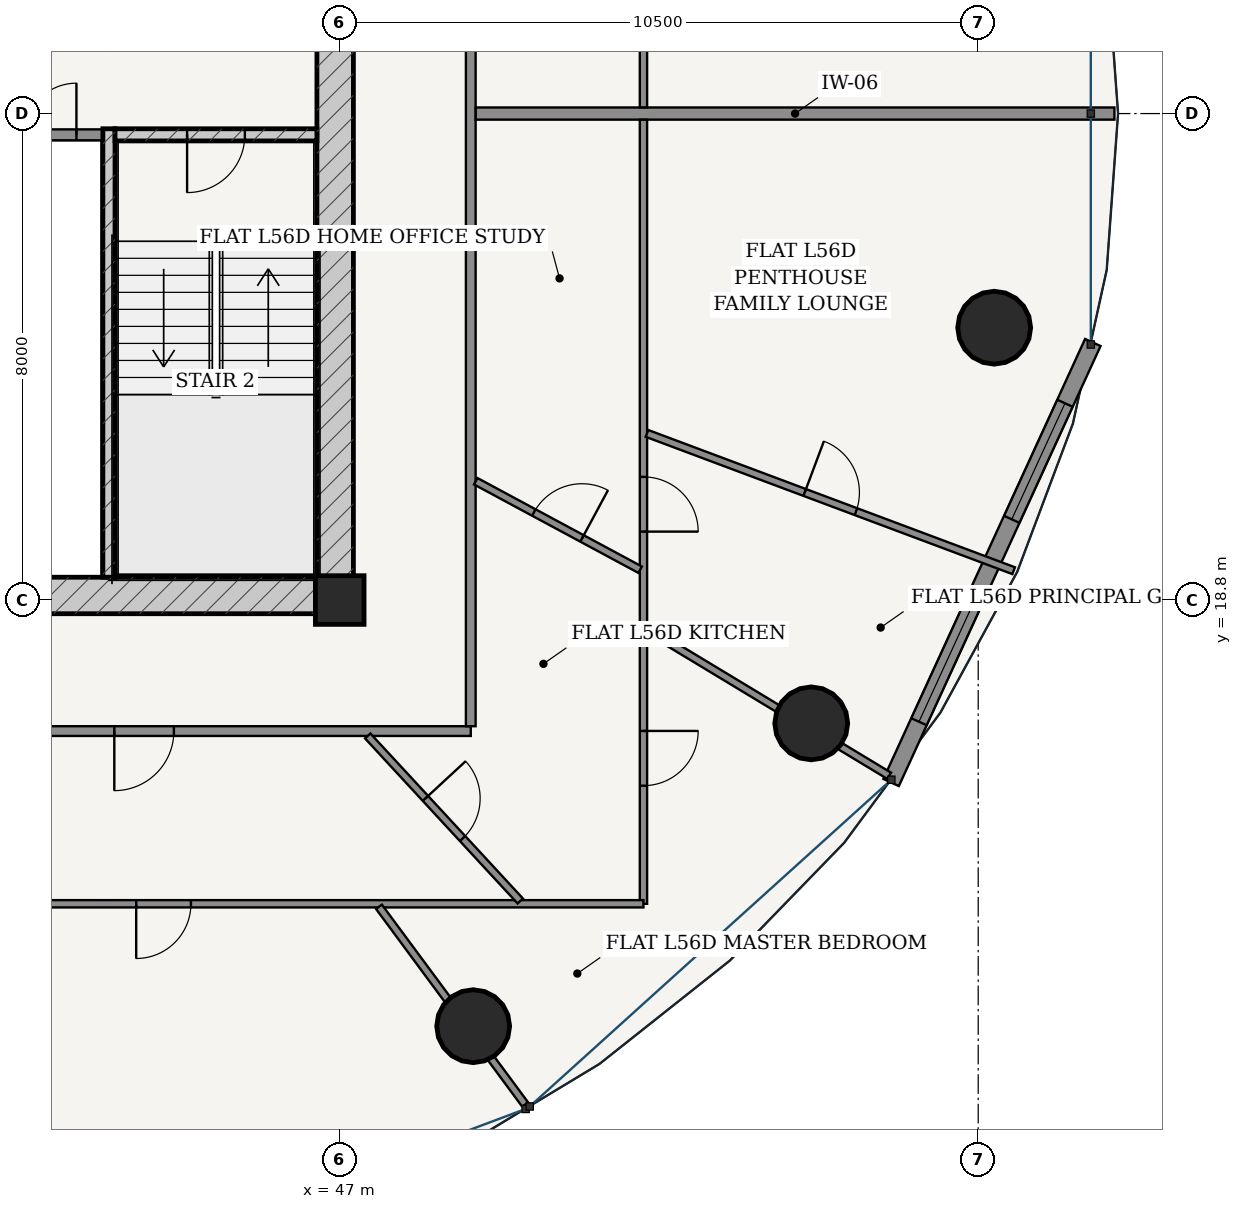
"""IFC4 building model, lengths in metres.
Left out: names, types, materials, properties, quantities, classifications, styles, units other than length and angle.
Written with IfcOpenShell. Run it as: python <this file> out.ifc"""

import sys

from ifc_helpers import new_model, si_unit, direction, frame, frame_2d, origin, origin_2d, place, context, subcontext, project, spatial, rectangle, hollow_circle, extrude, source, transform, mapped, element, fill, save


model = new_model("IFC4")
c1 = context("Model", 3, precision=1e-05, world=origin(), true_north=direction((-0.2419218956, 0.970295726276)))
c2 = subcontext(c1, "Body", "Model", "MODEL_VIEW")
j1 = project(units=[si_unit("LENGTHUNIT", "METRE"), si_unit("PLANEANGLEUNIT", "RADIAN")], contexts=[c1])
p1 = place(None, origin())
s1 = spatial("IfcSite", under=j1, at=p1, CompositionType="ELEMENT")
p2 = place(p1, origin())
s2 = spatial("IfcBuilding", under=s1, at=p2, CompositionType="ELEMENT")
p3 = place(p2, frame((0.0, 0.0, 213.4)))
s3 = spatial("IfcBuildingStorey", under=s2, at=p3, CompositionType="ELEMENT", Elevation=213.4)
p4 = place(p3, frame((47.0, 18.8, 0.0), z_axis=(0.0, 0.0, 1.0), x_axis=(1.0, 0.0, 0.0)))
e1 = element("IfcColumn", 1, at=p4, inside=s3, PredefinedType="COLUMN", context=c2, shape_type="SweptSolid", body=[
    extrude(rectangle(XDim=0.8, YDim=0.8, at=origin_2d()), origin(), (0.0, 0.0, 1.0), 3.7),
])
p5 = place(p3, frame((28.775, 18.875, 0.0), z_axis=(0.0, 0.0, 1.0), x_axis=(1.0, 0.0, 0.0)))
e2 = element("IfcWall", 2, at=p5, inside=s3, PredefinedType="SHEAR", context=c2, shape_type="SweptSolid", body=[
    extrude(rectangle(XDim=18.45, YDim=0.6, at=frame_2d((9.225, 0.0))), origin(), (0.0, 0.0, 1.0), 3.435),
])
p6 = place(p5, frame((7.46, 0.0, 0.0)))
e3 = element("IfcOpeningElement", 3, at=p6, cuts=e2, PredefinedType="OPENING", context=c2, shape_type="SweptSolid", body=[
    extrude(rectangle(XDim=0.85, YDim=2.1, at=frame_2d((0.425, 1.05))), frame((0.0, 0.31, 0.0), z_axis=(0.0, -1.0, 0.0), x_axis=(1.0, 0.0, 0.0)), (0.0, 0.0, 1.0), 0.62),
])
p7 = place(p5, frame((10.54, 0.0, 0.0)))
e4 = element("IfcOpeningElement", 4, at=p7, cuts=e2, PredefinedType="OPENING", context=c2, shape_type="SweptSolid", body=[
    extrude(rectangle(XDim=0.85, YDim=2.1, at=frame_2d((0.425, 1.05))), frame((0.0, 0.31, 0.0), z_axis=(0.0, -1.0, 0.0), x_axis=(1.0, 0.0, 0.0)), (0.0, 0.0, 1.0), 0.62),
])
p8 = place(p3, frame((46.925, 19.175, 0.0), z_axis=(0.0, 0.0, 1.0), x_axis=(0.0, 1.0, 0.0)))
e5 = element("IfcWall", 5, at=p8, inside=s3, PredefinedType="SHEAR", context=c2, shape_type="SweptSolid", body=[
    extrude(rectangle(XDim=15.25, YDim=0.6, at=frame_2d((7.625, 0.0))), origin(), (0.0, 0.0, 1.0), 3.435),
])
p9 = place(p8, frame((9.875, 0.0, 0.0)))
e6 = element("IfcOpeningElement", 6, at=p9, cuts=e5, PredefinedType="OPENING", context=c2, shape_type="SweptSolid", body=[
    extrude(rectangle(XDim=1.5, YDim=2.2, at=frame_2d((0.75, 1.1))), frame((0.0, 0.31, 0.0), z_axis=(0.0, -1.0, 0.0), x_axis=(1.0, 0.0, 0.0)), (0.0, 0.0, 1.0), 0.62),
])
p10 = place(p3, frame((43.205, 19.175, 0.0), z_axis=(0.0, 0.0, 1.0), x_axis=(0.0, 1.0, 0.0)))
e7 = element("IfcWall", 7, at=p10, inside=s3, PredefinedType="SOLIDWALL", context=c2, shape_type="SweptSolid", body=[
    extrude(rectangle(XDim=7.375, YDim=0.2, at=frame_2d((3.688, 0.0))), origin(), (0.0, 0.0, 1.0), 3.435),
])
p11 = place(p3, frame((43.305, 26.45, 0.0), z_axis=(0.0, 0.0, 1.0), x_axis=(1.0, 0.0, 0.0)))
e8 = element("IfcWall", 8, at=p11, inside=s3, PredefinedType="SOLIDWALL", context=c2, shape_type="SweptSolid", body=[
    extrude(rectangle(XDim=3.32, YDim=0.2, at=frame_2d((1.66, 0.0))), origin(), (0.0, 0.0, 1.0), 3.435),
])
p12 = place(p11, frame((1.185, 0.0, 0.0)))
e9 = element("IfcOpeningElement", 9, at=p12, cuts=e8, PredefinedType="OPENING", context=c2, shape_type="SweptSolid", body=[
    extrude(rectangle(XDim=0.95, YDim=2.15, at=frame_2d((0.475, 1.075))), frame((0.0, 0.11, 0.0), z_axis=(0.0, -1.0, 0.0), x_axis=(1.0, 0.0, 0.0)), (0.0, 0.0, 1.0), 0.22),
])
for number, where, z_axis, x_axis in (
    (10, (49.195, 11.792, 0.0), (0.0, 0.0, 1.0), (1.0, 0.0, 0.0)),
    (11, (54.754, 16.772, 0.0), (0.0, 0.0, 1.0), (1.0, 0.0, 0.0)),
    (12, (57.763, 23.279, 0.0), (0.0, 0.0, 1.0), (1.0, 0.0, 0.0)),
):
    element("IfcColumn", number, at=place(p3, frame(where, z_axis=z_axis, x_axis=x_axis)), inside=s3, PredefinedType="COLUMN", context=c2, shape_type="SweptSolid", body=[
        extrude(hollow_circle(Radius=0.6, WallThickness=0.038, at=origin_2d()), origin(), (0.0, 0.0, 1.0), 3.7),
    ])
p13 = place(p3, frame((56.068, 15.799, 0.0), z_axis=(0.0, 0.0, 1.0), x_axis=(0.416717018135, 0.909036262641, 0.0)))
e13 = element("IfcWall", 13, at=p13, inside=s3, PredefinedType="SOLIDWALL", context=c2, shape_type="SweptSolid", body=[
    extrude(rectangle(XDim=7.96, YDim=0.28, at=frame_2d((3.98, 0.0))), origin(), (0.0, 0.0, 1.0), 3.435),
])
p14 = place(p13, frame((1.099, 0.0, 0.85)))
e14 = element("IfcOpeningElement", 14, at=p14, cuts=e13, PredefinedType="OPENING", context=c2, shape_type="SweptSolid", body=[
    extrude(rectangle(XDim=2.1, YDim=1.95, at=frame_2d((1.05, 0.975))), frame((0.0, 0.15, 0.0), z_axis=(0.0, -1.0, 0.0), x_axis=(1.0, 0.0, 0.0)), (0.0, 0.0, 1.0), 0.3),
])
p15 = place(p13, frame((4.761, 0.0, 0.85)))
e15 = element("IfcOpeningElement", 15, at=p15, cuts=e13, PredefinedType="OPENING", context=c2, shape_type="SweptSolid", body=[
    extrude(rectangle(XDim=2.1, YDim=1.95, at=frame_2d((1.05, 0.975))), frame((0.0, 0.15, 0.0), z_axis=(0.0, -1.0, 0.0), x_axis=(1.0, 0.0, 0.0)), (0.0, 0.0, 1.0), 0.3),
])
p16 = place(p3, frame((41.39, 26.45, 0.0), z_axis=(0.0, 0.0, 1.0), x_axis=(1.0, 0.0, 0.0)))
e16 = element("IfcWall", 16, at=p16, inside=s3, PredefinedType="PARTITIONING", context=c2, shape_type="SweptSolid", body=[
    extrude(rectangle(XDim=1.71, YDim=0.18, at=frame_2d((0.855, 0.0))), origin(), (0.0, 0.0, 1.0), 3.435),
])
p17 = place(p16, frame((0.43, 0.0, 0.0)))
e17 = element("IfcOpeningElement", 17, at=p17, cuts=e16, PredefinedType="OPENING", context=c2, shape_type="SweptSolid", body=[
    extrude(rectangle(XDim=0.85, YDim=2.1, at=frame_2d((0.425, 1.05))), frame((0.0, 0.1, 0.0), z_axis=(0.0, -1.0, 0.0), x_axis=(1.0, 0.0, 0.0)), (0.0, 0.0, 1.0), 0.2),
])
p18 = place(p3, frame((34.32, 16.645, 0.0), z_axis=(0.0, 0.0, 1.0), x_axis=(1.0, 0.0, 0.0)))
e18 = element("IfcWall", 18, at=p18, inside=s3, PredefinedType="PARTITIONING", context=c2, shape_type="SweptSolid", body=[
    extrude(rectangle(XDim=14.835, YDim=0.16, at=frame_2d((7.417, 0.0))), origin(), (0.0, 0.0, 1.0), 2.951),
])
p19 = place(p18, frame((8.973, 0.0, 0.0)))
e19 = element("IfcOpeningElement", 19, at=p19, cuts=e18, PredefinedType="OPENING", context=c2, shape_type="SweptSolid", body=[
    extrude(rectangle(XDim=0.98, YDim=2.2, at=frame_2d((0.49, 1.1))), frame((0.0, 0.09, 0.0), z_axis=(0.0, -1.0, 0.0), x_axis=(1.0, 0.0, 0.0)), (0.0, 0.0, 1.0), 0.18),
])
p20 = place(p3, frame((49.155, 16.725, 0.0), z_axis=(0.0, 0.0, 1.0), x_axis=(0.0, 1.0, 0.0)))
e20 = element("IfcWall", 20, at=p20, inside=s3, PredefinedType="PARTITIONING", context=c2, shape_type="SweptSolid", body=[
    extrude(rectangle(XDim=18.3, YDim=0.16, at=frame_2d((9.15, 0.0))), origin(), (0.0, 0.0, 1.0), 2.951),
])
p21 = place(p20, frame((15.837, 0.0, 0.0)))
e21 = element("IfcOpeningElement", 21, at=p21, cuts=e20, PredefinedType="OPENING", context=c2, shape_type="SweptSolid", body=[
    extrude(rectangle(XDim=0.98, YDim=2.2, at=frame_2d((0.49, 1.1))), frame((0.0, 0.09, 0.0), z_axis=(0.0, -1.0, 0.0), x_axis=(1.0, 0.0, 0.0)), (0.0, 0.0, 1.0), 0.18),
])
p22 = place(p3, frame((49.237, 26.8, 0.0), z_axis=(0.0, 0.0, 1.0), x_axis=(1.0, 0.0, 0.0)))
e22 = element("IfcWall", 22, at=p22, inside=s3, PredefinedType="PARTITIONING", context=c2, shape_type="SweptSolid", body=[
    extrude(rectangle(XDim=10.503, YDim=0.2, at=frame_2d((5.251, 0.0))), origin(), (0.0, 0.0, 1.0), 2.951),
])
p23 = place(p3, frame((51.995, 37.945, 0.0), z_axis=(0.0, 0.0, 1.0), x_axis=(0.0, -1.0, 0.0)))
e23 = element("IfcWall", 23, at=p23, inside=s3, PredefinedType="PARTITIONING", context=c2, shape_type="SweptSolid", body=[
    extrude(rectangle(XDim=11.043, YDim=0.12, at=frame_2d((5.521, 0.0))), origin(), (0.0, 0.0, 1.0), 2.951),
])
p24 = place(p23, frame((2.46, 0.0, 0.0)))
e24 = element("IfcOpeningElement", 24, at=p24, cuts=e23, PredefinedType="OPENING", context=c2, shape_type="SweptSolid", body=[
    extrude(rectangle(XDim=0.9, YDim=2.15, at=frame_2d((0.45, 1.075))), frame((0.0, 0.07, 0.0), z_axis=(0.0, -1.0, 0.0), x_axis=(1.0, 0.0, 0.0)), (0.0, 0.0, 1.0), 0.14),
])
p25 = place(p3, frame((51.995, 26.698, 0.0), z_axis=(0.0, 0.0, 1.0), x_axis=(0.0, -1.0, 0.0)))
e25 = element("IfcWall", 25, at=p25, inside=s3, PredefinedType="PARTITIONING", context=c2, shape_type="SweptSolid", body=[
    extrude(rectangle(XDim=12.893, YDim=0.12, at=frame_2d((6.447, 0.0))), origin(), (0.0, 0.0, 1.0), 2.951),
])
p26 = place(p25, frame((10.051, 0.0, 0.0)))
e26 = element("IfcOpeningElement", 26, at=p26, cuts=e25, PredefinedType="OPENING", context=c2, shape_type="SweptSolid", body=[
    extrude(rectangle(XDim=0.9, YDim=2.15, at=frame_2d((0.45, 1.075))), frame((0.0, 0.07, 0.0), z_axis=(0.0, -1.0, 0.0), x_axis=(1.0, 0.0, 0.0)), (0.0, 0.0, 1.0), 0.14),
])
p27 = place(p25, frame((5.873, 0.0, 0.0)))
e27 = element("IfcOpeningElement", 27, at=p27, cuts=e25, PredefinedType="OPENING", context=c2, shape_type="SweptSolid", body=[
    extrude(rectangle(XDim=0.9, YDim=2.15, at=frame_2d((0.45, 1.075))), frame((0.0, 0.07, 0.0), z_axis=(0.0, -1.0, 0.0), x_axis=(1.0, 0.0, 0.0)), (0.0, 0.0, 1.0), 0.14),
])
p28 = place(p3, frame((51.995, 13.805, 0.0), z_axis=(0.0, 0.0, 1.0), x_axis=(-1.0, 0.0, 0.0)))
e28 = element("IfcWall", 28, at=p28, inside=s3, PredefinedType="PARTITIONING", context=c2, shape_type="SweptSolid", body=[
    extrude(rectangle(XDim=16.753, YDim=0.12, at=frame_2d((8.377, 0.0))), origin(), (0.0, 0.0, 1.0), 2.951),
])
p29 = place(p28, frame((7.442, 0.0, 0.0)))
e29 = element("IfcOpeningElement", 29, at=p29, cuts=e28, PredefinedType="OPENING", context=c2, shape_type="SweptSolid", body=[
    extrude(rectangle(XDim=0.9, YDim=2.15, at=frame_2d((0.45, 1.075))), frame((0.0, 0.07, 0.0), z_axis=(0.0, -1.0, 0.0), x_axis=(1.0, 0.0, 0.0)), (0.0, 0.0, 1.0), 0.14),
])
p30 = place(p3, frame((47.646, 13.755, 0.0), z_axis=(0.0, 0.0, 1.0), x_axis=(0.594518373783, -0.80408202519, 0.0)))
e30 = element("IfcWall", 30, at=p30, inside=s3, PredefinedType="PARTITIONING", context=c2, shape_type="SweptSolid", body=[
    extrude(rectangle(XDim=4.044, YDim=0.12, at=frame_2d((2.022, 0.0))), origin(), (0.0, 0.0, 1.0), 2.951),
])
p31 = place(p3, frame((52.048, 18.318, 0.0), z_axis=(0.0, 0.0, 1.0), x_axis=(0.856051317976, -0.516890840499, 0.0)))
e31 = element("IfcWall", 31, at=p31, inside=s3, PredefinedType="PARTITIONING", context=c2, shape_type="SweptSolid", body=[
    extrude(rectangle(XDim=4.658, YDim=0.12, at=frame_2d((2.329, 0.0))), origin(), (0.0, 0.0, 1.0), 2.951),
])
p32 = place(p3, frame((52.053, 21.54, 0.0), z_axis=(0.0, 0.0, 1.0), x_axis=(0.936534700322, -0.350574892274, 0.0)))
e32 = element("IfcWall", 32, at=p32, inside=s3, PredefinedType="PARTITIONING", context=c2, shape_type="SweptSolid", body=[
    extrude(rectangle(XDim=6.439, YDim=0.12, at=frame_2d((3.219, 0.0))), origin(), (0.0, 0.0, 1.0), 2.951),
])
p33 = place(p32, frame((2.769, 0.0, 0.0)))
e33 = element("IfcOpeningElement", 33, at=p33, cuts=e32, PredefinedType="OPENING", context=c2, shape_type="SweptSolid", body=[
    extrude(rectangle(XDim=0.9, YDim=2.15, at=frame_2d((0.45, 1.075))), frame((0.0, 0.07, 0.0), z_axis=(0.0, -1.0, 0.0), x_axis=(1.0, 0.0, 0.0)), (0.0, 0.0, 1.0), 0.14),
])
p34 = place(p3, frame((47.46, 16.565, 0.0), z_axis=(0.0, 0.0, 1.0), x_axis=(0.678787443458, -0.734334805524, 0.0)))
e34 = element("IfcWall", 34, at=p34, inside=s3, PredefinedType="PARTITIONING", context=c2, shape_type="SweptSolid", body=[
    extrude(rectangle(XDim=3.696, YDim=0.12, at=frame_2d((1.848, 0.0))), origin(), (0.0, 0.0, 1.0), 2.951),
])
p35 = place(p34, frame((1.398, 0.0, 0.0)))
e35 = element("IfcOpeningElement", 35, at=p35, cuts=e34, PredefinedType="OPENING", context=c2, shape_type="SweptSolid", body=[
    extrude(rectangle(XDim=0.9, YDim=2.15, at=frame_2d((0.45, 1.075))), frame((0.0, 0.07, 0.0), z_axis=(0.0, -1.0, 0.0), x_axis=(1.0, 0.0, 0.0)), (0.0, 0.0, 1.0), 0.14),
])
p36 = place(p3, frame((49.237, 20.753, 0.0), z_axis=(0.0, 0.0, 1.0), x_axis=(0.880601289356, -0.473857963091, 0.0)))
e36 = element("IfcWall", 36, at=p36, inside=s3, PredefinedType="PARTITIONING", context=c2, shape_type="SweptSolid", body=[
    extrude(rectangle(XDim=3.07, YDim=0.12, at=frame_2d((1.535, 0.0))), origin(), (0.0, 0.0, 1.0), 3.11),
])
p37 = place(p36, frame((1.085, 0.0, 0.0)))
e37 = element("IfcOpeningElement", 37, at=p37, cuts=e36, PredefinedType="OPENING", context=c2, shape_type="SweptSolid", body=[
    extrude(rectangle(XDim=0.9, YDim=2.15, at=frame_2d((0.45, 1.075))), frame((0.0, 0.07, 0.0), z_axis=(0.0, -1.0, 0.0), x_axis=(1.0, 0.0, 0.0)), (0.0, 0.0, 1.0), 0.14),
])
m1 = source(origin(), c2, "Body", "SweptSolid", [
    extrude(rectangle(XDim=2.1, YDim=1.95, at=frame_2d((1.05, 0.975))), frame((0.0, 0.03, 0.0), z_axis=(0.0, -1.0, 0.0), x_axis=(1.0, 0.0, 0.0)), (0.0, 0.0, 1.0), 0.06),
])
p38 = place(p14, origin())
e38 = element("IfcWindow", 38, at=p38, inside=s3, PartitioningType="SINGLE_PANEL", PredefinedType="WINDOW", context=c2, shape_type="MappedRepresentation", body=[
    mapped(m1, transform((0.0, 0.0, 0.0), scale=1.0)),
])
fill(e14, e38)
p39 = place(p15, origin())
e39 = element("IfcWindow", 39, at=p39, inside=s3, PartitioningType="SINGLE_PANEL", PredefinedType="WINDOW", context=c2, shape_type="MappedRepresentation", body=[
    mapped(m1, transform((0.0, 0.0, 0.0), scale=1.0)),
])
fill(e15, e39)
m2 = source(origin(), c2, "Body", "SweptSolid", [
    extrude(rectangle(XDim=0.95, YDim=2.15, at=frame_2d((0.475, 1.075))), frame((0.0, 0.025, 0.0), z_axis=(0.0, -1.0, 0.0), x_axis=(1.0, 0.0, 0.0)), (0.0, 0.0, 1.0), 0.05),
])
p40 = place(p12, frame((0.95, 0.0, 0.0), z_axis=(0.0, 0.0, 1.0), x_axis=(-1.0, 0.0, 0.0)))
e40 = element("IfcDoor", 40, at=p40, inside=s3, OperationType="SINGLE_SWING_RIGHT", PredefinedType="DOOR", context=c2, shape_type="MappedRepresentation", body=[
    mapped(m2, transform((0.0, 0.0, 0.0), scale=1.0)),
])
fill(e9, e40)
m3 = source(origin(), c2, "Body", "SweptSolid", [
    extrude(rectangle(XDim=0.85, YDim=2.1, at=frame_2d((0.425, 1.05))), frame((0.0, 0.025, 0.0), z_axis=(0.0, -1.0, 0.0), x_axis=(1.0, 0.0, 0.0)), (0.0, 0.0, 1.0), 0.05),
])
p41 = place(p17, origin())
e41 = element("IfcDoor", 41, at=p41, inside=s3, OperationType="SINGLE_SWING_RIGHT", PredefinedType="DOOR", context=c2, shape_type="MappedRepresentation", body=[
    mapped(m3, transform((0.0, 0.0, 0.0), scale=1.0)),
])
fill(e17, e41)
m4 = source(origin(), c2, "Body", "SweptSolid", [
    extrude(rectangle(XDim=0.98, YDim=2.2, at=frame_2d((0.49, 1.1))), frame((0.0, 0.025, 0.0), z_axis=(0.0, -1.0, 0.0), x_axis=(1.0, 0.0, 0.0)), (0.0, 0.0, 1.0), 0.05),
])
p42 = place(p19, frame((0.98, 0.0, 0.0), z_axis=(0.0, 0.0, 1.0), x_axis=(-1.0, 0.0, 0.0)))
e42 = element("IfcDoor", 42, at=p42, inside=s3, OperationType="SINGLE_SWING_RIGHT", PredefinedType="DOOR", context=c2, shape_type="MappedRepresentation", body=[
    mapped(m4, transform((0.0, 0.0, 0.0), scale=1.0)),
])
fill(e19, e42)
m5 = source(origin(), c2, "Body", "SweptSolid", [
    extrude(rectangle(XDim=0.9, YDim=2.15, at=frame_2d((0.45, 1.075))), frame((0.0, 0.025, 0.0), z_axis=(0.0, -1.0, 0.0), x_axis=(1.0, 0.0, 0.0)), (0.0, 0.0, 1.0), 0.05),
])
p43 = place(p29, origin())
e43 = element("IfcDoor", 43, at=p43, inside=s3, OperationType="SINGLE_SWING_RIGHT", PredefinedType="DOOR", context=c2, shape_type="MappedRepresentation", body=[
    mapped(m5, transform((0.0, 0.0, 0.0), scale=1.0)),
])
fill(e29, e43)
p44 = place(p35, origin())
e44 = element("IfcDoor", 44, at=p44, inside=s3, OperationType="SINGLE_SWING_LEFT", PredefinedType="DOOR", context=c2, shape_type="MappedRepresentation", body=[
    mapped(m5, transform((0.0, 0.0, 0.0), scale=1.0)),
])
fill(e35, e44)
p45 = place(p37, origin())
e45 = element("IfcDoor", 45, at=p45, inside=s3, OperationType="SINGLE_SWING_RIGHT", PredefinedType="DOOR", context=c2, shape_type="MappedRepresentation", body=[
    mapped(m5, transform((0.0, 0.0, 0.0), scale=1.0)),
])
fill(e37, e45)
p46 = place(p26, origin())
e46 = element("IfcDoor", 46, at=p46, inside=s3, OperationType="SINGLE_SWING_LEFT", PredefinedType="DOOR", context=c2, shape_type="MappedRepresentation", body=[
    mapped(m5, transform((0.0, 0.0, 0.0), scale=1.0)),
])
fill(e26, e46)
p47 = place(p27, origin())
e47 = element("IfcDoor", 47, at=p47, inside=s3, OperationType="SINGLE_SWING_RIGHT", PredefinedType="DOOR", context=c2, shape_type="MappedRepresentation", body=[
    mapped(m5, transform((0.0, 0.0, 0.0), scale=1.0)),
])
fill(e27, e47)
p48 = place(p33, origin())
e48 = element("IfcDoor", 48, at=p48, inside=s3, OperationType="SINGLE_SWING_LEFT", PredefinedType="DOOR", context=c2, shape_type="MappedRepresentation", body=[
    mapped(m5, transform((0.0, 0.0, 0.0), scale=1.0)),
])
fill(e33, e48)
save(model, sys.argv[1])
